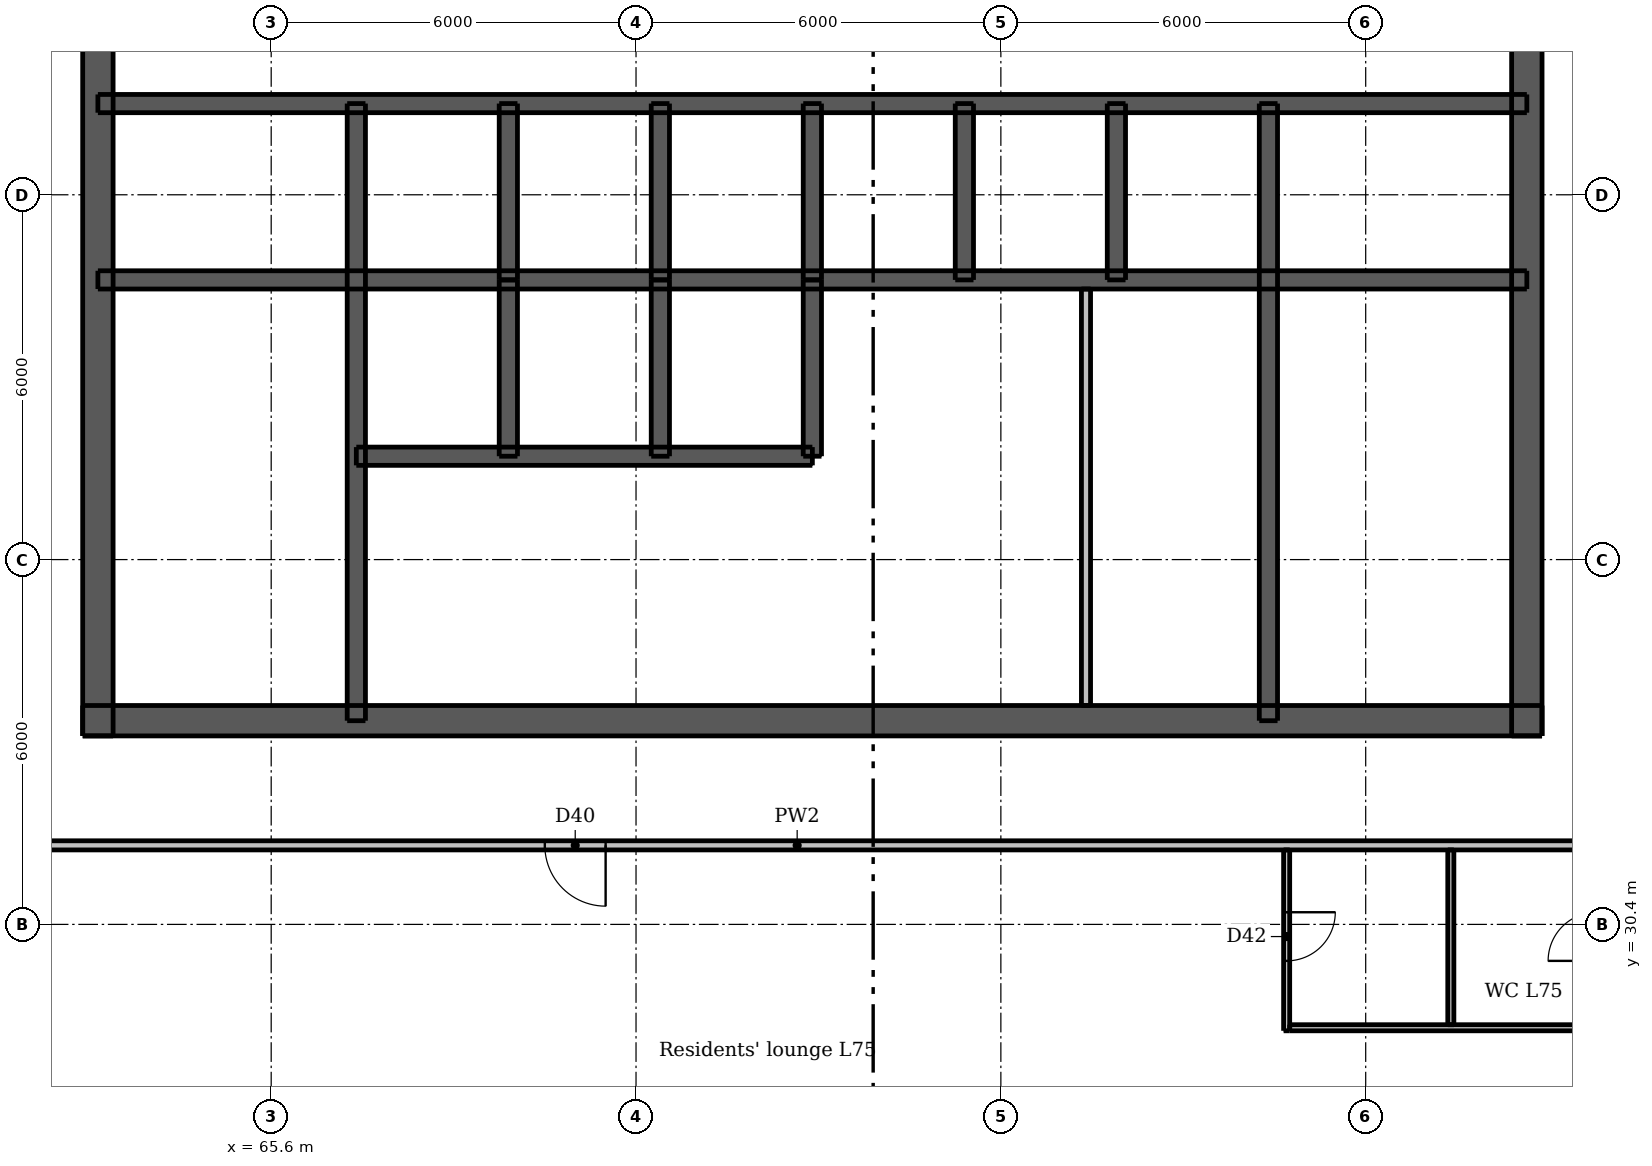
"""IFC4 building model, lengths in metres.
Left out: names, types, materials, properties, quantities, classifications, styles, units other than length and angle.
Written with IfcOpenShell. Run it as: python <this file> out.ifc"""

import sys

from ifc_helpers import new_model, si_unit, direction, frame, frame_2d, origin, place, context, subcontext, project, spatial, rectangle, extrude, element, fill, save


model = new_model("IFC4")
c1 = context("Model", 3, precision=1e-05, world=origin(), true_north=direction((0.0, 1.0)))
c2 = subcontext(c1, "Body", "Model", "MODEL_VIEW")
j1 = project(units=[si_unit("LENGTHUNIT", "METRE"), si_unit("PLANEANGLEUNIT", "RADIAN")], contexts=[c1])
p1 = place(None, origin())
s1 = spatial("IfcSite", under=j1, at=p1, CompositionType="ELEMENT")
p2 = place(p1, origin())
s2 = spatial("IfcBuilding", under=s1, at=p2, CompositionType="ELEMENT")
p3 = place(p2, frame((0.0, 0.0, 278.5)))
s3 = spatial("IfcBuildingStorey", under=s2, at=p3, CompositionType="ELEMENT", Elevation=278.5)
p4 = place(p3, frame((62.5, 33.75, 0.0), z_axis=(0.0, 0.0, 1.0), x_axis=(1.0, 0.0, 0.0)))
e1 = element("IfcWall", 1, at=p4, inside=s3, PredefinedType="SHEAR", context=c2, shape_type="SweptSolid", body=[
    extrude(rectangle(XDim=24.0, YDim=0.5, at=frame_2d((12.0, 0.0))), origin(), (0.0, 0.0, 1.0), 3.0),
])
p5 = place(p4, frame((1.875, 0.0, 0.0)))
e2 = element("IfcOpeningElement", 2, at=p5, cuts=e1, PredefinedType="OPENING", context=c2, shape_type="SweptSolid", body=[
    extrude(rectangle(XDim=1.1, YDim=2.1, at=frame_2d((0.55, 1.05))), frame((0.0, 0.26, 0.0), z_axis=(0.0, -1.0, 0.0), x_axis=(1.0, 0.0, 0.0)), (0.0, 0.0, 1.0), 0.52),
])
p6 = place(p4, frame((21.025, 0.0, 0.0)))
e3 = element("IfcOpeningElement", 3, at=p6, cuts=e1, PredefinedType="OPENING", context=c2, shape_type="SweptSolid", body=[
    extrude(rectangle(XDim=1.1, YDim=2.1, at=frame_2d((0.55, 1.05))), frame((0.0, 0.26, 0.0), z_axis=(0.0, -1.0, 0.0), x_axis=(1.0, 0.0, 0.0)), (0.0, 0.0, 1.0), 0.52),
])
p7 = place(p4, frame((8.0, 0.0, 0.0)))
e4 = element("IfcOpeningElement", 4, at=p7, cuts=e1, PredefinedType="OPENING", context=c2, shape_type="SweptSolid", body=[
    extrude(rectangle(XDim=1.1, YDim=2.1, at=frame_2d((0.55, 1.05))), frame((0.0, 0.26, 0.0), z_axis=(0.0, -1.0, 0.0), x_axis=(1.0, 0.0, 0.0)), (0.0, 0.0, 1.0), 0.52),
])
p8 = place(p4, frame((17.512, 0.0, 0.0)))
e5 = element("IfcOpeningElement", 5, at=p8, cuts=e1, PredefinedType="OPENING", context=c2, shape_type="SweptSolid", body=[
    extrude(rectangle(XDim=0.9, YDim=2.1, at=frame_2d((0.45, 1.05))), frame((0.0, 0.26, 0.0), z_axis=(0.0, -1.0, 0.0), x_axis=(1.0, 0.0, 0.0)), (0.0, 0.0, 1.0), 0.52),
])
p9 = place(p3, frame((62.75, 33.5, 0.0), z_axis=(0.0, 0.0, 1.0), x_axis=(0.0, 1.0, 0.0)))
e6 = element("IfcWall", 6, at=p9, inside=s3, PredefinedType="SHEAR", context=c2, shape_type="SweptSolid", body=[
    extrude(rectangle(XDim=24.0, YDim=0.5, at=frame_2d((12.0, 0.0))), origin(), (0.0, 0.0, 1.0), 3.0),
])
p10 = place(p9, frame((11.2, 0.0, 0.0)))
e7 = element("IfcOpeningElement", 7, at=p10, cuts=e6, PredefinedType="OPENING", context=c2, shape_type="SweptSolid", body=[
    extrude(rectangle(XDim=1.6, YDim=2.1, at=frame_2d((0.8, 1.05))), frame((0.0, 0.26, 0.0), z_axis=(0.0, -1.0, 0.0), x_axis=(1.0, 0.0, 0.0)), (0.0, 0.0, 1.0), 0.52),
])
p11 = place(p3, frame((86.25, 33.5, 0.0), z_axis=(0.0, 0.0, 1.0), x_axis=(0.0, 1.0, 0.0)))
e8 = element("IfcWall", 8, at=p11, inside=s3, PredefinedType="SHEAR", context=c2, shape_type="SweptSolid", body=[
    extrude(rectangle(XDim=24.0, YDim=0.5, at=frame_2d((12.0, 0.0))), origin(), (0.0, 0.0, 1.0), 3.0),
])
p12 = place(p11, frame((11.2, 0.0, 0.0)))
e9 = element("IfcOpeningElement", 9, at=p12, cuts=e8, PredefinedType="OPENING", context=c2, shape_type="SweptSolid", body=[
    extrude(rectangle(XDim=1.6, YDim=2.1, at=frame_2d((0.8, 1.05))), frame((0.0, 0.26, 0.0), z_axis=(0.0, -1.0, 0.0), x_axis=(1.0, 0.0, 0.0)), (0.0, 0.0, 1.0), 0.52),
])
p13 = place(p3, frame((62.75, 41.0, 0.0), z_axis=(0.0, 0.0, 1.0), x_axis=(1.0, 0.0, 0.0)))
e10 = element("IfcWall", 10, at=p13, inside=s3, PredefinedType="SHEAR", context=c2, shape_type="SweptSolid", body=[
    extrude(rectangle(XDim=23.5, YDim=0.3, at=frame_2d((11.75, 0.0))), origin(), (0.0, 0.0, 1.0), 3.0),
])
p14 = place(p3, frame((62.75, 43.9, 0.0), z_axis=(0.0, 0.0, 1.0), x_axis=(1.0, 0.0, 0.0)))
e11 = element("IfcWall", 11, at=p14, inside=s3, PredefinedType="SHEAR", context=c2, shape_type="SweptSolid", body=[
    extrude(rectangle(XDim=23.5, YDim=0.3, at=frame_2d((11.75, 0.0))), origin(), (0.0, 0.0, 1.0), 3.0),
])
p15 = place(p14, frame((1.725, 0.0, 0.0)))
e12 = element("IfcOpeningElement", 12, at=p15, cuts=e11, PredefinedType="OPENING", context=c2, shape_type="SweptSolid", body=[
    extrude(rectangle(XDim=0.9, YDim=2.1, at=frame_2d((0.45, 1.05))), frame((0.0, 0.16, 0.0), z_axis=(0.0, -1.0, 0.0), x_axis=(1.0, 0.0, 0.0)), (0.0, 0.0, 1.0), 0.32),
])
p16 = place(p14, frame((20.875, 0.0, 0.0)))
e13 = element("IfcOpeningElement", 13, at=p16, cuts=e11, PredefinedType="OPENING", context=c2, shape_type="SweptSolid", body=[
    extrude(rectangle(XDim=0.9, YDim=2.1, at=frame_2d((0.45, 1.05))), frame((0.0, 0.16, 0.0), z_axis=(0.0, -1.0, 0.0), x_axis=(1.0, 0.0, 0.0)), (0.0, 0.0, 1.0), 0.32),
])
p17 = place(p14, frame((5.05, 0.0, 0.0)))
e14 = element("IfcOpeningElement", 14, at=p17, cuts=e11, PredefinedType="OPENING", context=c2, shape_type="SweptSolid", body=[
    extrude(rectangle(XDim=0.9, YDim=2.1, at=frame_2d((0.45, 1.05))), frame((0.0, 0.16, 0.0), z_axis=(0.0, -1.0, 0.0), x_axis=(1.0, 0.0, 0.0)), (0.0, 0.0, 1.0), 0.32),
])
p18 = place(p14, frame((10.05, 0.0, 0.0)))
e15 = element("IfcOpeningElement", 15, at=p18, cuts=e11, PredefinedType="OPENING", context=c2, shape_type="SweptSolid", body=[
    extrude(rectangle(XDim=0.9, YDim=2.1, at=frame_2d((0.45, 1.05))), frame((0.0, 0.16, 0.0), z_axis=(0.0, -1.0, 0.0), x_axis=(1.0, 0.0, 0.0)), (0.0, 0.0, 1.0), 0.32),
])
p19 = place(p14, frame((12.55, 0.0, 0.0)))
e16 = element("IfcOpeningElement", 16, at=p19, cuts=e11, PredefinedType="OPENING", context=c2, shape_type="SweptSolid", body=[
    extrude(rectangle(XDim=0.9, YDim=2.1, at=frame_2d((0.45, 1.05))), frame((0.0, 0.16, 0.0), z_axis=(0.0, -1.0, 0.0), x_axis=(1.0, 0.0, 0.0)), (0.0, 0.0, 1.0), 0.32),
])
p20 = place(p14, frame((17.55, 0.0, 0.0)))
e17 = element("IfcOpeningElement", 17, at=p20, cuts=e11, PredefinedType="OPENING", context=c2, shape_type="SweptSolid", body=[
    extrude(rectangle(XDim=0.9, YDim=2.1, at=frame_2d((0.45, 1.05))), frame((0.0, 0.16, 0.0), z_axis=(0.0, -1.0, 0.0), x_axis=(1.0, 0.0, 0.0)), (0.0, 0.0, 1.0), 0.32),
])
p21 = place(p3, frame((67.0, 33.75, 0.0), z_axis=(0.0, 0.0, 1.0), x_axis=(0.0, 1.0, 0.0)))
e18 = element("IfcWall", 18, at=p21, inside=s3, PredefinedType="SHEAR", context=c2, shape_type="SweptSolid", body=[
    extrude(rectangle(XDim=10.15, YDim=0.3, at=frame_2d((5.075, 0.0))), origin(), (0.0, 0.0, 1.0), 3.0),
])
p22 = place(p21, frame((0.45, 0.0, 0.0)))
e19 = element("IfcOpeningElement", 19, at=p22, cuts=e18, PredefinedType="OPENING", context=c2, shape_type="SweptSolid", body=[
    extrude(rectangle(XDim=1.1, YDim=2.1, at=frame_2d((0.55, 1.05))), frame((0.0, 0.16, 0.0), z_axis=(0.0, -1.0, 0.0), x_axis=(1.0, 0.0, 0.0)), (0.0, 0.0, 1.0), 0.32),
])
p23 = place(p3, frame((82.0, 33.75, 0.0), z_axis=(0.0, 0.0, 1.0), x_axis=(0.0, 1.0, 0.0)))
e20 = element("IfcWall", 20, at=p23, inside=s3, PredefinedType="SHEAR", context=c2, shape_type="SweptSolid", body=[
    extrude(rectangle(XDim=10.15, YDim=0.3, at=frame_2d((5.075, 0.0))), origin(), (0.0, 0.0, 1.0), 3.0),
])
for number, where, z_axis, x_axis in (
    (21, (69.5, 41.0, 0.0), (0.0, 0.0, 1.0), (0.0, 1.0, 0.0)),
    (22, (72.0, 41.0, 0.0), (0.0, 0.0, 1.0), (0.0, 1.0, 0.0)),
    (23, (74.5, 41.0, 0.0), (0.0, 0.0, 1.0), (0.0, 1.0, 0.0)),
    (24, (77.0, 41.0, 0.0), (0.0, 0.0, 1.0), (0.0, 1.0, 0.0)),
    (25, (79.5, 41.0, 0.0), (0.0, 0.0, 1.0), (0.0, 1.0, 0.0)),
):
    element("IfcWall", number, at=place(p3, frame(where, z_axis=z_axis, x_axis=x_axis)), inside=s3, PredefinedType="SHEAR", context=c2, shape_type="SweptSolid", body=[
        extrude(rectangle(XDim=2.9, YDim=0.3, at=frame_2d((1.45, 0.0))), origin(), (0.0, 0.0, 1.0), 3.0),
    ])
p24 = place(p3, frame((67.0, 38.1, 0.0), z_axis=(0.0, 0.0, 1.0), x_axis=(1.0, 0.0, 0.0)))
e26 = element("IfcWall", 26, at=p24, inside=s3, PredefinedType="SHEAR", context=c2, shape_type="SweptSolid", body=[
    extrude(rectangle(XDim=7.5, YDim=0.3, at=frame_2d((3.75, 0.0))), origin(), (0.0, 0.0, 1.0), 3.0),
])
p25 = place(p24, frame((0.7, 0.0, 0.0)))
e27 = element("IfcOpeningElement", 27, at=p25, cuts=e26, PredefinedType="OPENING", context=c2, shape_type="SweptSolid", body=[
    extrude(rectangle(XDim=1.1, YDim=2.1, at=frame_2d((0.55, 1.05))), frame((0.0, 0.16, 0.0), z_axis=(0.0, -1.0, 0.0), x_axis=(1.0, 0.0, 0.0)), (0.0, 0.0, 1.0), 0.32),
])
p26 = place(p24, frame((3.2, 0.0, 0.0)))
e28 = element("IfcOpeningElement", 28, at=p26, cuts=e26, PredefinedType="OPENING", context=c2, shape_type="SweptSolid", body=[
    extrude(rectangle(XDim=1.1, YDim=2.1, at=frame_2d((0.55, 1.05))), frame((0.0, 0.16, 0.0), z_axis=(0.0, -1.0, 0.0), x_axis=(1.0, 0.0, 0.0)), (0.0, 0.0, 1.0), 0.32),
])
p27 = place(p24, frame((5.65, 0.0, 0.0)))
e29 = element("IfcOpeningElement", 29, at=p27, cuts=e26, PredefinedType="OPENING", context=c2, shape_type="SweptSolid", body=[
    extrude(rectangle(XDim=1.2, YDim=2.1, at=frame_2d((0.6, 1.05))), frame((0.0, 0.16, 0.0), z_axis=(0.0, -1.0, 0.0), x_axis=(1.0, 0.0, 0.0)), (0.0, 0.0, 1.0), 0.32),
])
for number, where, z_axis, x_axis in (
    (30, (69.5, 38.1, 0.0), (0.0, 0.0, 1.0), (0.0, 1.0, 0.0)),
    (31, (72.0, 38.1, 0.0), (0.0, 0.0, 1.0), (0.0, 1.0, 0.0)),
    (32, (74.5, 38.1, 0.0), (0.0, 0.0, 1.0), (0.0, 1.0, 0.0)),
):
    element("IfcWall", number, at=place(p3, frame(where, z_axis=z_axis, x_axis=x_axis)), inside=s3, PredefinedType="SHEAR", context=c2, shape_type="SweptSolid", body=[
        extrude(rectangle(XDim=2.9, YDim=0.3, at=frame_2d((1.45, 0.0))), origin(), (0.0, 0.0, 1.0), 3.0),
    ])
p28 = place(p3, frame((79.0, 34.0, 0.0), z_axis=(0.0, 0.0, 1.0), x_axis=(0.0, 1.0, 0.0)))
e33 = element("IfcWall", 33, at=p28, inside=s3, PredefinedType="PLUMBINGWALL", context=c2, shape_type="SweptSolid", body=[
    extrude(rectangle(XDim=6.85, YDim=0.15, at=frame_2d((3.425, 0.0))), origin(), (0.0, 0.0, 1.0), 3.0),
])
p29 = place(p3, frame((82.3, 31.625, 0.0), z_axis=(0.0, 0.0, 1.0), x_axis=(0.0, -1.0, 0.0)))
e34 = element("IfcWall", 34, at=p29, inside=s3, PredefinedType="PARTITIONING", context=c2, shape_type="SweptSolid", body=[
    extrude(rectangle(XDim=2.975, YDim=0.1, at=frame_2d((1.488, 0.0))), origin(), (0.0, 0.0, 1.0), 3.0),
])
p30 = place(p29, frame((1.025, 0.0, 0.0)))
e35 = element("IfcOpeningElement", 35, at=p30, cuts=e34, PredefinedType="OPENING", context=c2, shape_type="SweptSolid", body=[
    extrude(rectangle(XDim=0.8, YDim=2.1, at=frame_2d((0.4, 1.05))), frame((0.0, 0.06, 0.0), z_axis=(0.0, -1.0, 0.0), x_axis=(1.0, 0.0, 0.0)), (0.0, 0.0, 1.0), 0.12),
])
p31 = place(p3, frame((85.0, 28.75, 0.0), z_axis=(0.0, 0.0, 1.0), x_axis=(0.0, 1.0, 0.0)))
e36 = element("IfcWall", 36, at=p31, inside=s3, PredefinedType="PARTITIONING", context=c2, shape_type="SweptSolid", body=[
    extrude(rectangle(XDim=2.875, YDim=0.1, at=frame_2d((1.438, 0.0))), origin(), (0.0, 0.0, 1.0), 3.0),
])
p32 = place(p3, frame((82.35, 28.7, 0.0), z_axis=(0.0, 0.0, 1.0), x_axis=(1.0, 0.0, 0.0)))
e37 = element("IfcWall", 37, at=p32, inside=s3, PredefinedType="PARTITIONING", context=c2, shape_type="SweptSolid", body=[
    extrude(rectangle(XDim=5.0, YDim=0.1, at=frame_2d((2.5, 0.0))), origin(), (0.0, 0.0, 1.0), 3.0),
])
p33 = place(p3, frame((89.525, 31.7, 0.0), z_axis=(0.0, 0.0, 1.0), x_axis=(-1.0, 0.0, 0.0)))
e38 = element("IfcWall", 38, at=p33, inside=s3, PredefinedType="PARTITIONING", context=c2, shape_type="SweptSolid", body=[
    extrude(rectangle(XDim=30.55, YDim=0.15, at=frame_2d((15.275, 0.0))), origin(), (0.0, 0.0, 1.0), 3.0),
])
p34 = place(p33, frame((18.425, 0.0, 0.0)))
e39 = element("IfcOpeningElement", 39, at=p34, cuts=e38, PredefinedType="OPENING", context=c2, shape_type="SweptSolid", body=[
    extrude(rectangle(XDim=1.0, YDim=2.1, at=frame_2d((0.5, 1.05))), frame((0.0, 0.085, 0.0), z_axis=(0.0, -1.0, 0.0), x_axis=(1.0, 0.0, 0.0)), (0.0, 0.0, 1.0), 0.17),
])
p35 = place(p5, origin())
e40 = element("IfcDoor", 40, at=p35, inside=s3, OperationType="SINGLE_SWING_LEFT", PredefinedType="DOOR", context=c2, shape_type="SweptSolid", body=[
    extrude(rectangle(XDim=1.1, YDim=2.1, at=frame_2d((0.55, 1.05))), frame((0.0, 0.237, 0.0), z_axis=(0.0, -1.0, 0.0), x_axis=(1.0, 0.0, 0.0)), (0.0, 0.0, 1.0), 0.05),
])
fill(e2, e40)
p36 = place(p6, origin())
e41 = element("IfcDoor", 41, at=p36, inside=s3, OperationType="SINGLE_SWING_RIGHT", PredefinedType="DOOR", context=c2, shape_type="SweptSolid", body=[
    extrude(rectangle(XDim=1.1, YDim=2.1, at=frame_2d((0.55, 1.05))), frame((0.0, 0.237, 0.0), z_axis=(0.0, -1.0, 0.0), x_axis=(1.0, 0.0, 0.0)), (0.0, 0.0, 1.0), 0.05),
])
fill(e3, e41)
p37 = place(p10, origin())
e42 = element("IfcDoor", 42, at=p37, inside=s3, OperationType="DOUBLE_DOOR_SINGLE_SWING", PredefinedType="DOOR", context=c2, shape_type="SweptSolid", body=[
    extrude(rectangle(XDim=1.6, YDim=2.1, at=frame_2d((0.8, 1.05))), frame((0.0, -0.188, 0.0), z_axis=(0.0, -1.0, 0.0), x_axis=(1.0, 0.0, 0.0)), (0.0, 0.0, 1.0), 0.05),
])
fill(e7, e42)
p38 = place(p12, origin())
e43 = element("IfcDoor", 43, at=p38, inside=s3, OperationType="DOUBLE_DOOR_SINGLE_SWING", PredefinedType="DOOR", context=c2, shape_type="SweptSolid", body=[
    extrude(rectangle(XDim=1.6, YDim=2.1, at=frame_2d((0.8, 1.05))), frame((0.0, 0.237, 0.0), z_axis=(0.0, -1.0, 0.0), x_axis=(1.0, 0.0, 0.0)), (0.0, 0.0, 1.0), 0.05),
])
fill(e9, e43)
p39 = place(p7, origin())
e44 = element("IfcDoor", 44, at=p39, inside=s3, OperationType="SINGLE_SWING_LEFT", PredefinedType="DOOR", context=c2, shape_type="SweptSolid", body=[
    extrude(rectangle(XDim=1.1, YDim=2.1, at=frame_2d((0.55, 1.05))), frame((0.0, 0.237, 0.0), z_axis=(0.0, -1.0, 0.0), x_axis=(1.0, 0.0, 0.0)), (0.0, 0.0, 1.0), 0.05),
])
fill(e4, e44)
p40 = place(p22, origin())
e45 = element("IfcDoor", 45, at=p40, inside=s3, OperationType="SINGLE_SWING_RIGHT", PredefinedType="DOOR", context=c2, shape_type="SweptSolid", body=[
    extrude(rectangle(XDim=1.1, YDim=2.1, at=frame_2d((0.55, 1.05))), frame((0.0, -0.087, 0.0), z_axis=(0.0, -1.0, 0.0), x_axis=(1.0, 0.0, 0.0)), (0.0, 0.0, 1.0), 0.05),
])
fill(e19, e45)
p41 = place(p8, origin())
e46 = element("IfcDoor", 46, at=p41, inside=s3, OperationType="SINGLE_SWING_LEFT", PredefinedType="DOOR", context=c2, shape_type="SweptSolid", body=[
    extrude(rectangle(XDim=0.9, YDim=2.1, at=frame_2d((0.45, 1.05))), frame((0.0, 0.237, 0.0), z_axis=(0.0, -1.0, 0.0), x_axis=(1.0, 0.0, 0.0)), (0.0, 0.0, 1.0), 0.05),
])
fill(e5, e46)
p42 = place(p15, origin())
e47 = element("IfcDoor", 47, at=p42, inside=s3, OperationType="SINGLE_SWING_LEFT", PredefinedType="DOOR", context=c2, shape_type="SweptSolid", body=[
    extrude(rectangle(XDim=0.9, YDim=2.1, at=frame_2d((0.45, 1.05))), frame((0.0, -0.087, 0.0), z_axis=(0.0, -1.0, 0.0), x_axis=(1.0, 0.0, 0.0)), (0.0, 0.0, 1.0), 0.05),
])
fill(e12, e47)
p43 = place(p16, origin())
e48 = element("IfcDoor", 48, at=p43, inside=s3, OperationType="SINGLE_SWING_LEFT", PredefinedType="DOOR", context=c2, shape_type="SweptSolid", body=[
    extrude(rectangle(XDim=0.9, YDim=2.1, at=frame_2d((0.45, 1.05))), frame((0.0, -0.087, 0.0), z_axis=(0.0, -1.0, 0.0), x_axis=(1.0, 0.0, 0.0)), (0.0, 0.0, 1.0), 0.05),
])
fill(e13, e48)
p44 = place(p17, origin())
e49 = element("IfcDoor", 49, at=p44, inside=s3, OperationType="SINGLE_SWING_RIGHT", PredefinedType="DOOR", context=c2, shape_type="SweptSolid", body=[
    extrude(rectangle(XDim=0.9, YDim=2.1, at=frame_2d((0.45, 1.05))), frame((0.0, -0.087, 0.0), z_axis=(0.0, -1.0, 0.0), x_axis=(1.0, 0.0, 0.0)), (0.0, 0.0, 1.0), 0.05),
])
fill(e14, e49)
p45 = place(p18, origin())
e50 = element("IfcDoor", 50, at=p45, inside=s3, OperationType="SINGLE_SWING_RIGHT", PredefinedType="DOOR", context=c2, shape_type="SweptSolid", body=[
    extrude(rectangle(XDim=0.9, YDim=2.1, at=frame_2d((0.45, 1.05))), frame((0.0, -0.087, 0.0), z_axis=(0.0, -1.0, 0.0), x_axis=(1.0, 0.0, 0.0)), (0.0, 0.0, 1.0), 0.05),
])
fill(e15, e50)
p46 = place(p19, origin())
e51 = element("IfcDoor", 51, at=p46, inside=s3, OperationType="SINGLE_SWING_LEFT", PredefinedType="DOOR", context=c2, shape_type="SweptSolid", body=[
    extrude(rectangle(XDim=0.9, YDim=2.1, at=frame_2d((0.45, 1.05))), frame((0.0, -0.087, 0.0), z_axis=(0.0, -1.0, 0.0), x_axis=(1.0, 0.0, 0.0)), (0.0, 0.0, 1.0), 0.05),
])
fill(e16, e51)
p47 = place(p20, origin())
e52 = element("IfcDoor", 52, at=p47, inside=s3, OperationType="SINGLE_SWING_LEFT", PredefinedType="DOOR", context=c2, shape_type="SweptSolid", body=[
    extrude(rectangle(XDim=0.9, YDim=2.1, at=frame_2d((0.45, 1.05))), frame((0.0, -0.087, 0.0), z_axis=(0.0, -1.0, 0.0), x_axis=(1.0, 0.0, 0.0)), (0.0, 0.0, 1.0), 0.05),
])
fill(e17, e52)
p48 = place(p25, origin())
e53 = element("IfcDoor", 53, at=p48, inside=s3, OperationType="DOUBLE_DOOR_SLIDING", PredefinedType="DOOR", context=c2, shape_type="SweptSolid", body=[
    extrude(rectangle(XDim=1.1, YDim=2.1, at=frame_2d((0.55, 1.05))), frame((0.0, 0.025, 0.0), z_axis=(0.0, -1.0, 0.0), x_axis=(1.0, 0.0, 0.0)), (0.0, 0.0, 1.0), 0.05),
])
fill(e27, e53)
p49 = place(p26, origin())
e54 = element("IfcDoor", 54, at=p49, inside=s3, OperationType="DOUBLE_DOOR_SLIDING", PredefinedType="DOOR", context=c2, shape_type="SweptSolid", body=[
    extrude(rectangle(XDim=1.1, YDim=2.1, at=frame_2d((0.55, 1.05))), frame((0.0, 0.025, 0.0), z_axis=(0.0, -1.0, 0.0), x_axis=(1.0, 0.0, 0.0)), (0.0, 0.0, 1.0), 0.05),
])
fill(e28, e54)
p50 = place(p27, origin())
e55 = element("IfcDoor", 55, at=p50, inside=s3, OperationType="DOUBLE_DOOR_SLIDING", PredefinedType="DOOR", context=c2, shape_type="SweptSolid", body=[
    extrude(rectangle(XDim=1.2, YDim=2.1, at=frame_2d((0.6, 1.05))), frame((0.0, 0.025, 0.0), z_axis=(0.0, -1.0, 0.0), x_axis=(1.0, 0.0, 0.0)), (0.0, 0.0, 1.0), 0.05),
])
fill(e29, e55)
p51 = place(p34, origin())
e56 = element("IfcDoor", 56, at=p51, inside=s3, OperationType="SINGLE_SWING_LEFT", PredefinedType="DOOR", context=c2, shape_type="SweptSolid", body=[
    extrude(rectangle(XDim=1.0, YDim=2.1, at=frame_2d((0.5, 1.05))), frame((0.0, 0.025, 0.0), z_axis=(0.0, -1.0, 0.0), x_axis=(1.0, 0.0, 0.0)), (0.0, 0.0, 1.0), 0.05),
])
fill(e39, e56)
p52 = place(p30, origin())
e57 = element("IfcDoor", 57, at=p52, inside=s3, OperationType="SINGLE_SWING_LEFT", PredefinedType="DOOR", context=c2, shape_type="SweptSolid", body=[
    extrude(rectangle(XDim=0.8, YDim=2.1, at=frame_2d((0.4, 1.05))), frame((0.0, 0.025, 0.0), z_axis=(0.0, -1.0, 0.0), x_axis=(1.0, 0.0, 0.0)), (0.0, 0.0, 1.0), 0.05),
])
fill(e35, e57)
save(model, sys.argv[1])
